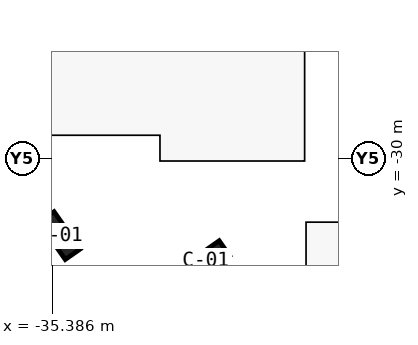
"""IFC4 building model, lengths in metres.
Left out: names, types, materials, properties, quantities, classifications, styles, units other than length and angle.
Written with IfcOpenShell. Run it as: python <this file> out.ifc"""

import sys

from ifc_helpers import new_model, si_unit, direction, frame, origin, origin_2d, place, context, subcontext, project, spatial, rectangle, extrude, element, save


model = new_model("IFC4")
c1 = context("Model", 3, precision=1e-05, world=origin(), true_north=direction((0.0, 1.0)))
c2 = subcontext(c1, "Body", "Model", "MODEL_VIEW")
j1 = project(units=[si_unit("LENGTHUNIT", "METRE"), si_unit("PLANEANGLEUNIT", "RADIAN")], contexts=[c1])
p1 = place(None, origin())
s1 = spatial("IfcSite", under=j1, at=p1, CompositionType="ELEMENT")
p2 = place(p1, origin())
s2 = spatial("IfcBuilding", under=s1, at=p2, CompositionType="ELEMENT")
p3 = place(p2, frame((0.0, 0.0, -9.0)))
s3 = spatial("IfcBuildingStorey", under=s2, at=p3, CompositionType="ELEMENT", Elevation=-9.0)
for number, where, z_axis, x_axis in (
    (1, (-30.336, -33.388, 0.0), (0.0, 0.0, 1.0), (-0.819, -0.574, 0.0)),
    (2, (-35.14, -32.541, 0.0), (0.0, 0.0, 1.0), (-0.574, 0.819, 0.0)),
):
    element("IfcColumn", number, at=place(p3, frame(where, z_axis=z_axis, x_axis=x_axis)), inside=s3, PredefinedType="COLUMN", context=c2, shape_type="SweptSolid", body=[
        extrude(rectangle(XDim=1.5, YDim=0.6, at=origin_2d()), origin(), (0.0, 0.0, 1.0), 4.5),
    ])
save(model, sys.argv[1])
